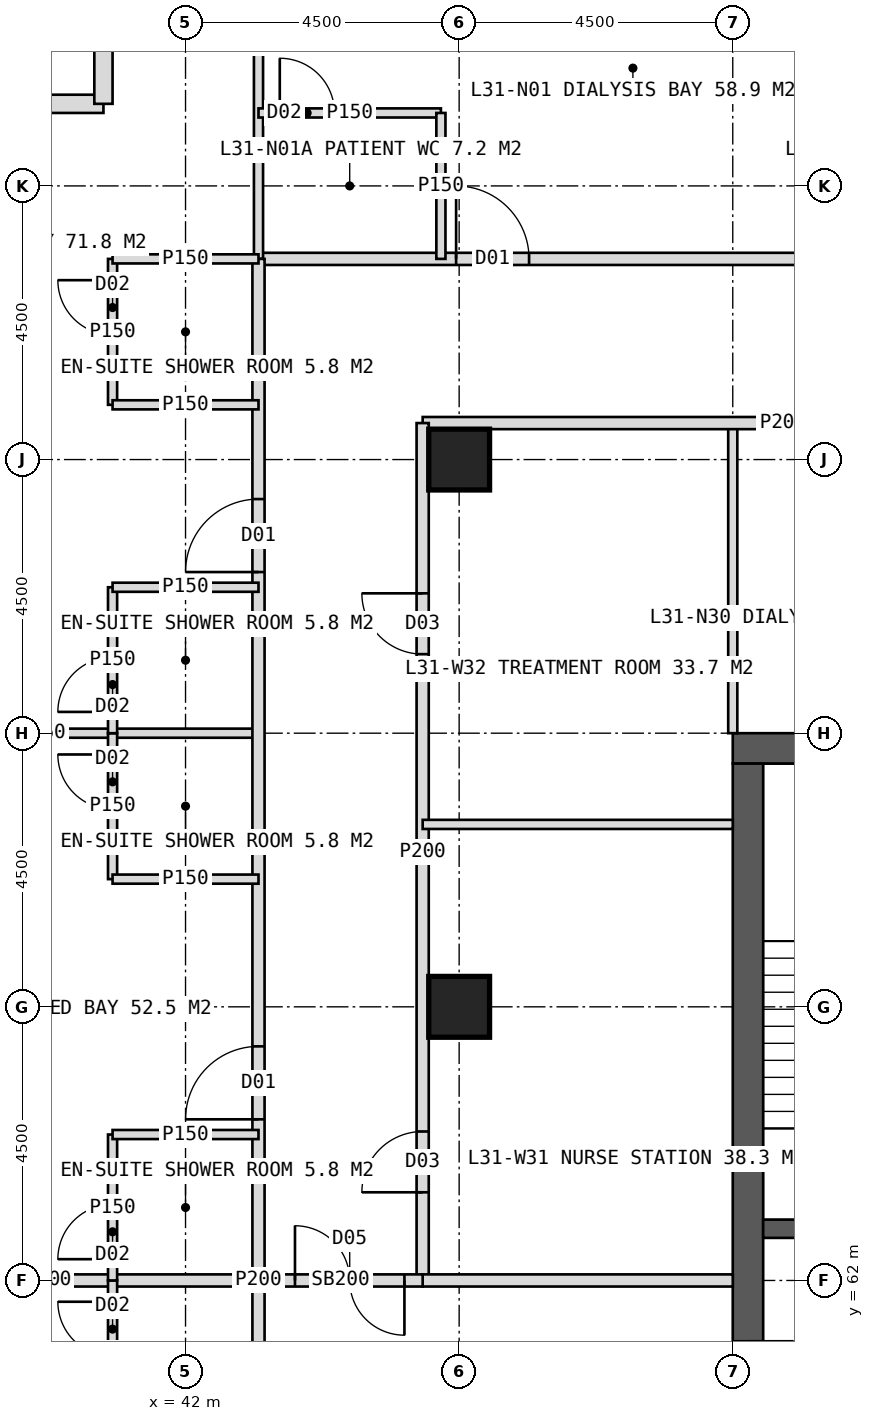
"""IFC4 building model, lengths in metres.
Left out: names, types, materials, properties, quantities, classifications, styles, units other than length and angle.
Written with IfcOpenShell. Run it as: python <this file> out.ifc"""

import sys

from ifc_helpers import new_model, si_unit, direction, frame, frame_2d, origin, origin_2d, place, context, subcontext, project, spatial, rectangle, hollow_rectangle, extrude, element, fill, save


model = new_model("IFC4")
c1 = context("Model", 3, precision=1e-05, world=origin(), true_north=direction((0.0, 1.0)))
c2 = subcontext(c1, "Body", "Model", "MODEL_VIEW")
j1 = project(units=[si_unit("LENGTHUNIT", "METRE"), si_unit("PLANEANGLEUNIT", "RADIAN")], contexts=[c1])
p1 = place(None, origin())
s1 = spatial("IfcSite", under=j1, at=p1, CompositionType="ELEMENT")
p2 = place(p1, origin())
s2 = spatial("IfcBuilding", under=s1, at=p2, CompositionType="ELEMENT")
p3 = place(p2, frame((0.0, 0.0, 132.0)))
s3 = spatial("IfcBuildingStorey", under=s2, at=p3, CompositionType="ELEMENT", Elevation=132.0)
p4 = place(p3, frame((51.0, 70.75, 0.0), z_axis=(0.0, 0.0, 1.0), x_axis=(1.0, 0.0, 0.0)))
e1 = element("IfcWall", 1, at=p4, inside=s3, PredefinedType="SHEAR", context=c2, shape_type="SweptSolid", body=[
    extrude(rectangle(XDim=18.0, YDim=0.5, at=frame_2d((9.0, 0.0))), origin(), (0.0, 0.0, 1.0), 4.0),
])
p5 = place(p4, frame((8.1, 0.0, 0.0)))
e2 = element("IfcOpeningElement", 2, at=p5, cuts=e1, PredefinedType="OPENING", context=c2, shape_type="SweptSolid", body=[
    extrude(rectangle(XDim=1.8, YDim=2.2, at=frame_2d((0.9, 1.1))), frame((0.0, 0.26, 0.0), z_axis=(0.0, -1.0, 0.0), x_axis=(1.0, 0.0, 0.0)), (0.0, 0.0, 1.0), 0.52),
])
p6 = place(p3, frame((51.25, 53.5, 0.0), z_axis=(0.0, 0.0, 1.0), x_axis=(0.0, 1.0, 0.0)))
e3 = element("IfcWall", 3, at=p6, inside=s3, PredefinedType="SHEAR", context=c2, shape_type="SweptSolid", body=[
    extrude(rectangle(XDim=17.0, YDim=0.5, at=frame_2d((8.5, 0.0))), origin(), (0.0, 0.0, 1.0), 4.0),
])
p7 = place(p6, frame((6.0, 0.0, 0.0)))
e4 = element("IfcOpeningElement", 4, at=p7, cuts=e3, PredefinedType="OPENING", context=c2, shape_type="SweptSolid", body=[
    extrude(rectangle(XDim=1.5, YDim=2.2, at=frame_2d((0.75, 1.1))), frame((0.0, 0.26, 0.0), z_axis=(0.0, -1.0, 0.0), x_axis=(1.0, 0.0, 0.0)), (0.0, 0.0, 1.0), 0.52),
])
p8 = place(p3, frame((51.5, 62.85, 0.0), z_axis=(0.0, 0.0, 1.0), x_axis=(1.0, 0.0, 0.0)))
e5 = element("IfcWall", 5, at=p8, inside=s3, PredefinedType="SHEAR", context=c2, shape_type="SweptSolid", body=[
    extrude(rectangle(XDim=3.3, YDim=0.3, at=frame_2d((1.65, 0.0))), origin(), (0.0, 0.0, 1.0), 4.0),
])
p9 = place(p8, frame((1.05, 0.0, 0.0)))
e6 = element("IfcOpeningElement", 6, at=p9, cuts=e5, PredefinedType="OPENING", context=c2, shape_type="SweptSolid", body=[
    extrude(rectangle(XDim=1.2, YDim=2.1, at=frame_2d((0.6, 1.05))), frame((0.0, 0.16, 0.0), z_axis=(0.0, -1.0, 0.0), x_axis=(1.0, 0.0, 0.0)), (0.0, 0.0, 1.0), 0.32),
])
for number, where, z_axis, x_axis in (
    (7, (46.5, 75.5, 0.0), (0.0, 0.0, 1.0), (1.0, 0.0, 0.0)),
    (8, (46.5, 66.5, 0.0), (0.0, 0.0, 1.0), (1.0, 0.0, 0.0)),
):
    element("IfcColumn", number, at=place(p3, frame(where, z_axis=z_axis, x_axis=x_axis)), inside=s3, PredefinedType="COLUMN", context=c2, shape_type="SweptSolid", body=[
        extrude(hollow_rectangle(XDim=1.0, YDim=1.0, WallThickness=0.1, at=origin_2d()), origin(), (0.0, 0.0, 1.0), 4.0),
    ])
for number, where, z_axis, x_axis in (
    (9, (36.85, 81.35, 0.0), (0.0, 0.0, 1.0), (1.0, 0.0, 0.0)),
    (10, (40.65, 81.35, 0.0), (0.0, 0.0, 1.0), (0.0, 1.0, 0.0)),
):
    element("IfcWall", number, at=place(p3, frame(where, z_axis=z_axis, x_axis=x_axis)), inside=s3, PredefinedType="ELEMENTEDWALL", context=c2, shape_type="SweptSolid", body=[
        extrude(rectangle(XDim=3.8, YDim=0.3, at=frame_2d((1.9, 0.0))), origin(), (0.0, 0.0, 1.0), 4.0),
    ])
p10 = place(p3, frame((43.2, 78.8, 0.0), z_axis=(0.0, 0.0, 1.0), x_axis=(1.0, 0.0, 0.0)))
e11 = element("IfcWall", 11, at=p10, inside=s3, PredefinedType="PARTITIONING", context=c2, shape_type="SweptSolid", body=[
    extrude(rectangle(XDim=33.6, YDim=0.2, at=frame_2d((16.8, 0.0))), origin(), (0.0, 0.0, 1.0), 3.75),
])
p11 = place(p10, frame((3.25, 0.0, 0.0)))
e12 = element("IfcOpeningElement", 12, at=p11, cuts=e11, PredefinedType="OPENING", context=c2, shape_type="SweptSolid", body=[
    extrude(rectangle(XDim=1.2, YDim=2.2, at=frame_2d((0.6, 1.1))), frame((0.0, 0.11, 0.0), z_axis=(0.0, -1.0, 0.0), x_axis=(1.0, 0.0, 0.0)), (0.0, 0.0, 1.0), 0.22),
])
p12 = place(p10, frame((12.55, 0.0, 0.0)))
e13 = element("IfcOpeningElement", 13, at=p12, cuts=e11, PredefinedType="OPENING", context=c2, shape_type="SweptSolid", body=[
    extrude(rectangle(XDim=1.2, YDim=2.2, at=frame_2d((0.6, 1.1))), frame((0.0, 0.11, 0.0), z_axis=(0.0, -1.0, 0.0), x_axis=(1.0, 0.0, 0.0)), (0.0, 0.0, 1.0), 0.22),
])
p13 = place(p10, frame((26.95, 0.0, 0.0)))
e14 = element("IfcOpeningElement", 14, at=p13, cuts=e11, PredefinedType="OPENING", context=c2, shape_type="SweptSolid", body=[
    extrude(rectangle(XDim=1.2, YDim=2.2, at=frame_2d((0.6, 1.1))), frame((0.0, 0.11, 0.0), z_axis=(0.0, -1.0, 0.0), x_axis=(1.0, 0.0, 0.0)), (0.0, 0.0, 1.0), 0.22),
])
p14 = place(p3, frame((43.2, 78.8, 0.0), z_axis=(0.0, 0.0, 1.0), x_axis=(0.0, 1.0, 0.0)))
e15 = element("IfcWall", 15, at=p14, inside=s3, PredefinedType="PARTITIONING", context=c2, shape_type="SweptSolid", body=[
    extrude(rectangle(XDim=7.11, YDim=0.15, at=frame_2d((3.555, 0.0))), origin(), (0.0, 0.0, 1.0), 3.75),
])
p15 = place(p3, frame((43.2, 81.2, 0.0), z_axis=(0.0, 0.0, 1.0), x_axis=(1.0, 0.0, 0.0)))
e16 = element("IfcWall", 16, at=p15, inside=s3, PredefinedType="PARTITIONING", context=c2, shape_type="SweptSolid", body=[
    extrude(rectangle(XDim=3.0, YDim=0.15, at=frame_2d((1.5, 0.0))), origin(), (0.0, 0.0, 1.0), 2.997),
])
p16 = place(p15, frame((0.35, 0.0, 0.0)))
e17 = element("IfcOpeningElement", 17, at=p16, cuts=e16, PredefinedType="OPENING", context=c2, shape_type="SweptSolid", body=[
    extrude(rectangle(XDim=0.9, YDim=2.1, at=frame_2d((0.45, 1.05))), frame((0.0, 0.085, 0.0), z_axis=(0.0, -1.0, 0.0), x_axis=(1.0, 0.0, 0.0)), (0.0, 0.0, 1.0), 0.17),
])
p17 = place(p3, frame((46.2, 78.8, 0.0), z_axis=(0.0, 0.0, 1.0), x_axis=(0.0, 1.0, 0.0)))
e18 = element("IfcWall", 18, at=p17, inside=s3, PredefinedType="PARTITIONING", context=c2, shape_type="SweptSolid", body=[
    extrude(rectangle(XDim=2.4, YDim=0.15, at=frame_2d((1.2, 0.0))), origin(), (0.0, 0.0, 1.0), 3.75),
])
p18 = place(p3, frame((51.0, 71.0, 0.0), z_axis=(0.0, 0.0, 1.0), x_axis=(0.0, 1.0, 0.0)))
e19 = element("IfcWall", 19, at=p18, inside=s3, PredefinedType="PARTITIONING", context=c2, shape_type="SweptSolid", body=[
    extrude(rectangle(XDim=5.1, YDim=0.15, at=frame_2d((2.55, 0.0))), origin(), (0.0, 0.0, 1.0), 3.75),
])
p19 = place(p3, frame((45.9, 76.1, 0.0), z_axis=(0.0, 0.0, 1.0), x_axis=(1.0, 0.0, 0.0)))
e20 = element("IfcWall", 20, at=p19, inside=s3, PredefinedType="PARTITIONING", context=c2, shape_type="SweptSolid", body=[
    extrude(rectangle(XDim=11.85, YDim=0.2, at=frame_2d((5.925, 0.0))), origin(), (0.0, 0.0, 1.0), 3.75),
])
p20 = place(p19, frame((6.55, 0.0, 0.0)))
e21 = element("IfcOpeningElement", 21, at=p20, cuts=e20, PredefinedType="OPENING", context=c2, shape_type="SweptSolid", body=[
    extrude(rectangle(XDim=1.0, YDim=2.1, at=frame_2d((0.5, 1.05))), frame((0.0, 0.11, 0.0), z_axis=(0.0, -1.0, 0.0), x_axis=(1.0, 0.0, 0.0)), (0.0, 0.0, 1.0), 0.22),
])
p21 = place(p3, frame((43.2, 62.0, 0.0), z_axis=(0.0, 0.0, 1.0), x_axis=(-1.0, 0.0, 0.0)))
e22 = element("IfcWall", 22, at=p21, inside=s3, PredefinedType="SOLIDWALL", context=c2, shape_type="SweptSolid", body=[
    extrude(rectangle(XDim=7.11, YDim=0.2, at=frame_2d((3.555, 0.0))), origin(), (0.0, 0.0, 1.0), 2.95),
])
p22 = place(p3, frame((43.2, 71.0, 0.0), z_axis=(0.0, 0.0, 1.0), x_axis=(-1.0, 0.0, 0.0)))
e23 = element("IfcWall", 23, at=p22, inside=s3, PredefinedType="PARTITIONING", context=c2, shape_type="SweptSolid", body=[
    extrude(rectangle(XDim=7.11, YDim=0.15, at=frame_2d((3.555, 0.0))), origin(), (0.0, 0.0, 1.0), 3.75),
])
p23 = place(p3, frame((43.2, 45.2, 0.0), z_axis=(0.0, 0.0, 1.0), x_axis=(0.0, 1.0, 0.0)))
e24 = element("IfcWall", 24, at=p23, inside=s3, PredefinedType="PARTITIONING", context=c2, shape_type="SweptSolid", body=[
    extrude(rectangle(XDim=33.6, YDim=0.2, at=frame_2d((16.8, 0.0))), origin(), (0.0, 0.0, 1.0), 3.75),
])
p24 = place(p23, frame((2.65, 0.0, 0.0)))
e25 = element("IfcOpeningElement", 25, at=p24, cuts=e24, PredefinedType="OPENING", context=c2, shape_type="SweptSolid", body=[
    extrude(rectangle(XDim=1.2, YDim=2.2, at=frame_2d((0.6, 1.1))), frame((0.0, 0.11, 0.0), z_axis=(0.0, -1.0, 0.0), x_axis=(1.0, 0.0, 0.0)), (0.0, 0.0, 1.0), 0.22),
])
p25 = place(p23, frame((8.95, 0.0, 0.0)))
e26 = element("IfcOpeningElement", 26, at=p25, cuts=e24, PredefinedType="OPENING", context=c2, shape_type="SweptSolid", body=[
    extrude(rectangle(XDim=1.2, YDim=2.2, at=frame_2d((0.6, 1.1))), frame((0.0, 0.11, 0.0), z_axis=(0.0, -1.0, 0.0), x_axis=(1.0, 0.0, 0.0)), (0.0, 0.0, 1.0), 0.22),
])
p26 = place(p23, frame((19.45, 0.0, 0.0)))
e27 = element("IfcOpeningElement", 27, at=p26, cuts=e24, PredefinedType="OPENING", context=c2, shape_type="SweptSolid", body=[
    extrude(rectangle(XDim=1.2, YDim=2.2, at=frame_2d((0.6, 1.1))), frame((0.0, 0.11, 0.0), z_axis=(0.0, -1.0, 0.0), x_axis=(1.0, 0.0, 0.0)), (0.0, 0.0, 1.0), 0.22),
])
p27 = place(p23, frame((28.45, 0.0, 0.0)))
e28 = element("IfcOpeningElement", 28, at=p27, cuts=e24, PredefinedType="OPENING", context=c2, shape_type="SweptSolid", body=[
    extrude(rectangle(XDim=1.2, YDim=2.2, at=frame_2d((0.6, 1.1))), frame((0.0, 0.11, 0.0), z_axis=(0.0, -1.0, 0.0), x_axis=(1.0, 0.0, 0.0)), (0.0, 0.0, 1.0), 0.22),
])
p28 = place(p3, frame((40.8, 59.6, 0.0), z_axis=(0.0, 0.0, 1.0), x_axis=(0.0, 1.0, 0.0)))
e29 = element("IfcWall", 29, at=p28, inside=s3, PredefinedType="PARTITIONING", context=c2, shape_type="SweptSolid", body=[
    extrude(rectangle(XDim=2.4, YDim=0.15, at=frame_2d((1.2, 0.0))), origin(), (0.0, 0.0, 1.0), 3.75),
])
p29 = place(p28, frame((1.15, 0.0, 0.0)))
e30 = element("IfcOpeningElement", 30, at=p29, cuts=e29, PredefinedType="OPENING", context=c2, shape_type="SweptSolid", body=[
    extrude(rectangle(XDim=0.9, YDim=2.1, at=frame_2d((0.45, 1.05))), frame((0.0, 0.085, 0.0), z_axis=(0.0, -1.0, 0.0), x_axis=(1.0, 0.0, 0.0)), (0.0, 0.0, 1.0), 0.17),
])
p30 = place(p3, frame((40.8, 62.0, 0.0), z_axis=(0.0, 0.0, 1.0), x_axis=(0.0, 1.0, 0.0)))
e31 = element("IfcWall", 31, at=p30, inside=s3, PredefinedType="PARTITIONING", context=c2, shape_type="SweptSolid", body=[
    extrude(rectangle(XDim=2.4, YDim=0.15, at=frame_2d((1.2, 0.0))), origin(), (0.0, 0.0, 1.0), 3.75),
])
p31 = place(p30, frame((0.35, 0.0, 0.0)))
e32 = element("IfcOpeningElement", 32, at=p31, cuts=e31, PredefinedType="OPENING", context=c2, shape_type="SweptSolid", body=[
    extrude(rectangle(XDim=0.9, YDim=2.1, at=frame_2d((0.45, 1.05))), frame((0.0, 0.085, 0.0), z_axis=(0.0, -1.0, 0.0), x_axis=(1.0, 0.0, 0.0)), (0.0, 0.0, 1.0), 0.17),
])
p32 = place(p3, frame((43.2, 64.4, 0.0), z_axis=(0.0, 0.0, 1.0), x_axis=(-1.0, 0.0, 0.0)))
e33 = element("IfcWall", 33, at=p32, inside=s3, PredefinedType="PARTITIONING", context=c2, shape_type="SweptSolid", body=[
    extrude(rectangle(XDim=2.4, YDim=0.15, at=frame_2d((1.2, 0.0))), origin(), (0.0, 0.0, 1.0), 3.75),
])
p33 = place(p3, frame((40.8, 68.6, 0.0), z_axis=(0.0, 0.0, 1.0), x_axis=(0.0, 1.0, 0.0)))
e34 = element("IfcWall", 34, at=p33, inside=s3, PredefinedType="PARTITIONING", context=c2, shape_type="SweptSolid", body=[
    extrude(rectangle(XDim=2.4, YDim=0.15, at=frame_2d((1.2, 0.0))), origin(), (0.0, 0.0, 1.0), 3.75),
])
p34 = place(p33, frame((1.15, 0.0, 0.0)))
e35 = element("IfcOpeningElement", 35, at=p34, cuts=e34, PredefinedType="OPENING", context=c2, shape_type="SweptSolid", body=[
    extrude(rectangle(XDim=0.9, YDim=2.1, at=frame_2d((0.45, 1.05))), frame((0.0, 0.085, 0.0), z_axis=(0.0, -1.0, 0.0), x_axis=(1.0, 0.0, 0.0)), (0.0, 0.0, 1.0), 0.17),
])
p35 = place(p3, frame((43.2, 68.6, 0.0), z_axis=(0.0, 0.0, 1.0), x_axis=(-1.0, 0.0, 0.0)))
e36 = element("IfcWall", 36, at=p35, inside=s3, PredefinedType="PARTITIONING", context=c2, shape_type="SweptSolid", body=[
    extrude(rectangle(XDim=2.4, YDim=0.15, at=frame_2d((1.2, 0.0))), origin(), (0.0, 0.0, 1.0), 3.75),
])
p36 = place(p3, frame((40.8, 71.0, 0.0), z_axis=(0.0, 0.0, 1.0), x_axis=(0.0, 1.0, 0.0)))
e37 = element("IfcWall", 37, at=p36, inside=s3, PredefinedType="PARTITIONING", context=c2, shape_type="SweptSolid", body=[
    extrude(rectangle(XDim=2.4, YDim=0.15, at=frame_2d((1.2, 0.0))), origin(), (0.0, 0.0, 1.0), 3.75),
])
p37 = place(p36, frame((0.35, 0.0, 0.0)))
e38 = element("IfcOpeningElement", 38, at=p37, cuts=e37, PredefinedType="OPENING", context=c2, shape_type="SweptSolid", body=[
    extrude(rectangle(XDim=0.9, YDim=2.1, at=frame_2d((0.45, 1.05))), frame((0.0, 0.085, 0.0), z_axis=(0.0, -1.0, 0.0), x_axis=(1.0, 0.0, 0.0)), (0.0, 0.0, 1.0), 0.17),
])
p38 = place(p3, frame((43.2, 73.4, 0.0), z_axis=(0.0, 0.0, 1.0), x_axis=(-1.0, 0.0, 0.0)))
e39 = element("IfcWall", 39, at=p38, inside=s3, PredefinedType="PARTITIONING", context=c2, shape_type="SweptSolid", body=[
    extrude(rectangle(XDim=2.4, YDim=0.15, at=frame_2d((1.2, 0.0))), origin(), (0.0, 0.0, 1.0), 3.75),
])
p39 = place(p3, frame((40.8, 76.4, 0.0), z_axis=(0.0, 0.0, 1.0), x_axis=(0.0, 1.0, 0.0)))
e40 = element("IfcWall", 40, at=p39, inside=s3, PredefinedType="PARTITIONING", context=c2, shape_type="SweptSolid", body=[
    extrude(rectangle(XDim=2.4, YDim=0.15, at=frame_2d((1.2, 0.0))), origin(), (0.0, 0.0, 1.0), 2.997),
])
p40 = place(p39, frame((1.15, 0.0, 0.0)))
e41 = element("IfcOpeningElement", 41, at=p40, cuts=e40, PredefinedType="OPENING", context=c2, shape_type="SweptSolid", body=[
    extrude(rectangle(XDim=0.9, YDim=2.1, at=frame_2d((0.45, 1.05))), frame((0.0, 0.085, 0.0), z_axis=(0.0, -1.0, 0.0), x_axis=(1.0, 0.0, 0.0)), (0.0, 0.0, 1.0), 0.17),
])
for number, where, z_axis, x_axis in (
    (42, (43.2, 76.4, 0.0), (0.0, 0.0, 1.0), (-1.0, 0.0, 0.0)),
    (43, (43.2, 78.8, 0.0), (0.0, 0.0, 1.0), (-1.0, 0.0, 0.0)),
):
    element("IfcWall", number, at=place(p3, frame(where, z_axis=z_axis, x_axis=x_axis)), inside=s3, PredefinedType="PARTITIONING", context=c2, shape_type="SweptSolid", body=[
        extrude(rectangle(XDim=2.4, YDim=0.15, at=frame_2d((1.2, 0.0))), origin(), (0.0, 0.0, 1.0), 3.75),
    ])
p41 = place(p3, frame((45.9, 62.0, 0.0), z_axis=(0.0, 0.0, 1.0), x_axis=(0.0, 1.0, 0.0)))
e44 = element("IfcWall", 44, at=p41, inside=s3, PredefinedType="PARTITIONING", context=c2, shape_type="SweptSolid", body=[
    extrude(rectangle(XDim=14.1, YDim=0.2, at=frame_2d((7.05, 0.0))), origin(), (0.0, 0.0, 1.0), 3.75),
])
p42 = place(p41, frame((1.45, 0.0, 0.0)))
e45 = element("IfcOpeningElement", 45, at=p42, cuts=e44, PredefinedType="OPENING", context=c2, shape_type="SweptSolid", body=[
    extrude(rectangle(XDim=1.0, YDim=2.1, at=frame_2d((0.5, 1.05))), frame((0.0, 0.11, 0.0), z_axis=(0.0, -1.0, 0.0), x_axis=(1.0, 0.0, 0.0)), (0.0, 0.0, 1.0), 0.22),
])
p43 = place(p41, frame((10.3, 0.0, 0.0)))
e46 = element("IfcOpeningElement", 46, at=p43, cuts=e44, PredefinedType="OPENING", context=c2, shape_type="SweptSolid", body=[
    extrude(rectangle(XDim=1.0, YDim=2.1, at=frame_2d((0.5, 1.05))), frame((0.0, 0.11, 0.0), z_axis=(0.0, -1.0, 0.0), x_axis=(1.0, 0.0, 0.0)), (0.0, 0.0, 1.0), 0.22),
])
p44 = place(p3, frame((51.0, 62.0, 0.0), z_axis=(0.0, 0.0, 1.0), x_axis=(-1.0, 0.0, 0.0)))
e47 = element("IfcWall", 47, at=p44, inside=s3, PredefinedType="SOLIDWALL", context=c2, shape_type="SweptSolid", body=[
    extrude(rectangle(XDim=5.1, YDim=0.2, at=frame_2d((2.55, 0.0))), origin(), (0.0, 0.0, 1.0), 2.95),
])
p45 = place(p3, frame((51.0, 69.5, 0.0), z_axis=(0.0, 0.0, 1.0), x_axis=(-1.0, 0.0, 0.0)))
e48 = element("IfcWall", 48, at=p45, inside=s3, PredefinedType="PARTITIONING", context=c2, shape_type="SweptSolid", body=[
    extrude(rectangle(XDim=5.1, YDim=0.15, at=frame_2d((2.55, 0.0))), origin(), (0.0, 0.0, 1.0), 3.75),
])
p46 = place(p3, frame((45.9, 62.0, 0.0), z_axis=(0.0, 0.0, 1.0), x_axis=(-1.0, 0.0, 0.0)))
e49 = element("IfcWall", 49, at=p46, inside=s3, PredefinedType="SOLIDWALL", context=c2, shape_type="SweptSolid", body=[
    extrude(rectangle(XDim=2.7, YDim=0.2, at=frame_2d((1.35, 0.0))), origin(), (0.0, 0.0, 1.0), 2.95),
])
p47 = place(p46, frame((0.3, 0.0, 0.0)))
e50 = element("IfcOpeningElement", 50, at=p47, cuts=e49, PredefinedType="OPENING", context=c2, shape_type="SweptSolid", body=[
    extrude(rectangle(XDim=1.8, YDim=2.2, at=frame_2d((0.9, 1.1))), frame((0.0, 0.11, 0.0), z_axis=(0.0, -1.0, 0.0), x_axis=(1.0, 0.0, 0.0)), (0.0, 0.0, 1.0), 0.22),
])
p48 = place(p11, origin())
e51 = element("IfcDoor", 51, at=p48, inside=s3, OperationType="SINGLE_SWING_LEFT", PredefinedType="DOOR", context=c2, shape_type="SweptSolid", body=[
    extrude(rectangle(XDim=1.2, YDim=2.2, at=frame_2d((0.6, 1.1))), frame((0.0, 0.025, 0.0), z_axis=(0.0, -1.0, 0.0), x_axis=(1.0, 0.0, 0.0)), (0.0, 0.0, 1.0), 0.05),
])
fill(e12, e51)
p49 = place(p16, origin())
e52 = element("IfcDoor", 52, at=p49, inside=s3, OperationType="SINGLE_SWING_LEFT", PredefinedType="DOOR", context=c2, shape_type="SweptSolid", body=[
    extrude(rectangle(XDim=0.9, YDim=2.1, at=frame_2d((0.45, 1.05))), frame((0.0, 0.025, 0.0), z_axis=(0.0, -1.0, 0.0), x_axis=(1.0, 0.0, 0.0)), (0.0, 0.0, 1.0), 0.05),
])
fill(e17, e52)
p50 = place(p29, origin())
e53 = element("IfcDoor", 53, at=p50, inside=s3, OperationType="SINGLE_SWING_RIGHT", PredefinedType="DOOR", context=c2, shape_type="SweptSolid", body=[
    extrude(rectangle(XDim=0.9, YDim=2.1, at=frame_2d((0.45, 1.05))), frame((0.0, 0.025, 0.0), z_axis=(0.0, -1.0, 0.0), x_axis=(1.0, 0.0, 0.0)), (0.0, 0.0, 1.0), 0.05),
])
fill(e30, e53)
p51 = place(p26, origin())
e54 = element("IfcDoor", 54, at=p51, inside=s3, OperationType="SINGLE_SWING_LEFT", PredefinedType="DOOR", context=c2, shape_type="SweptSolid", body=[
    extrude(rectangle(XDim=1.2, YDim=2.2, at=frame_2d((0.6, 1.1))), frame((0.0, 0.025, 0.0), z_axis=(0.0, -1.0, 0.0), x_axis=(1.0, 0.0, 0.0)), (0.0, 0.0, 1.0), 0.05),
])
fill(e27, e54)
p52 = place(p31, origin())
e55 = element("IfcDoor", 55, at=p52, inside=s3, OperationType="SINGLE_SWING_LEFT", PredefinedType="DOOR", context=c2, shape_type="SweptSolid", body=[
    extrude(rectangle(XDim=0.9, YDim=2.1, at=frame_2d((0.45, 1.05))), frame((0.0, 0.025, 0.0), z_axis=(0.0, -1.0, 0.0), x_axis=(1.0, 0.0, 0.0)), (0.0, 0.0, 1.0), 0.05),
])
fill(e32, e55)
p53 = place(p34, origin())
e56 = element("IfcDoor", 56, at=p53, inside=s3, OperationType="SINGLE_SWING_RIGHT", PredefinedType="DOOR", context=c2, shape_type="SweptSolid", body=[
    extrude(rectangle(XDim=0.9, YDim=2.1, at=frame_2d((0.45, 1.05))), frame((0.0, 0.025, 0.0), z_axis=(0.0, -1.0, 0.0), x_axis=(1.0, 0.0, 0.0)), (0.0, 0.0, 1.0), 0.05),
])
fill(e35, e56)
p54 = place(p27, origin())
e57 = element("IfcDoor", 57, at=p54, inside=s3, OperationType="SINGLE_SWING_LEFT", PredefinedType="DOOR", context=c2, shape_type="SweptSolid", body=[
    extrude(rectangle(XDim=1.2, YDim=2.2, at=frame_2d((0.6, 1.1))), frame((0.0, 0.025, 0.0), z_axis=(0.0, -1.0, 0.0), x_axis=(1.0, 0.0, 0.0)), (0.0, 0.0, 1.0), 0.05),
])
fill(e28, e57)
p55 = place(p37, origin())
e58 = element("IfcDoor", 58, at=p55, inside=s3, OperationType="SINGLE_SWING_LEFT", PredefinedType="DOOR", context=c2, shape_type="SweptSolid", body=[
    extrude(rectangle(XDim=0.9, YDim=2.1, at=frame_2d((0.45, 1.05))), frame((0.0, 0.025, 0.0), z_axis=(0.0, -1.0, 0.0), x_axis=(1.0, 0.0, 0.0)), (0.0, 0.0, 1.0), 0.05),
])
fill(e38, e58)
p56 = place(p40, origin())
e59 = element("IfcDoor", 59, at=p56, inside=s3, OperationType="SINGLE_SWING_RIGHT", PredefinedType="DOOR", context=c2, shape_type="SweptSolid", body=[
    extrude(rectangle(XDim=0.9, YDim=2.1, at=frame_2d((0.45, 1.05))), frame((0.0, 0.025, 0.0), z_axis=(0.0, -1.0, 0.0), x_axis=(1.0, 0.0, 0.0)), (0.0, 0.0, 1.0), 0.05),
])
fill(e41, e59)
p57 = place(p42, origin())
e60 = element("IfcDoor", 60, at=p57, inside=s3, OperationType="SINGLE_SWING_LEFT", PredefinedType="DOOR", context=c2, shape_type="SweptSolid", body=[
    extrude(rectangle(XDim=1.0, YDim=2.1, at=frame_2d((0.5, 1.05))), frame((0.0, 0.025, 0.0), z_axis=(0.0, -1.0, 0.0), x_axis=(1.0, 0.0, 0.0)), (0.0, 0.0, 1.0), 0.05),
])
fill(e45, e60)
p58 = place(p43, origin())
e61 = element("IfcDoor", 61, at=p58, inside=s3, OperationType="SINGLE_SWING_RIGHT", PredefinedType="DOOR", context=c2, shape_type="SweptSolid", body=[
    extrude(rectangle(XDim=1.0, YDim=2.1, at=frame_2d((0.5, 1.05))), frame((0.0, 0.025, 0.0), z_axis=(0.0, -1.0, 0.0), x_axis=(1.0, 0.0, 0.0)), (0.0, 0.0, 1.0), 0.05),
])
fill(e46, e61)
p59 = place(p47, origin())
e62 = element("IfcDoor", 62, at=p59, inside=s3, OperationType="DOUBLE_DOOR_DOUBLE_SWING", PredefinedType="DOOR", context=c2, shape_type="SweptSolid", body=[
    extrude(rectangle(XDim=1.8, YDim=2.2, at=frame_2d((0.9, 1.1))), frame((0.0, 0.025, 0.0), z_axis=(0.0, -1.0, 0.0), x_axis=(1.0, 0.0, 0.0)), (0.0, 0.0, 1.0), 0.05),
])
fill(e50, e62)
save(model, sys.argv[1])
